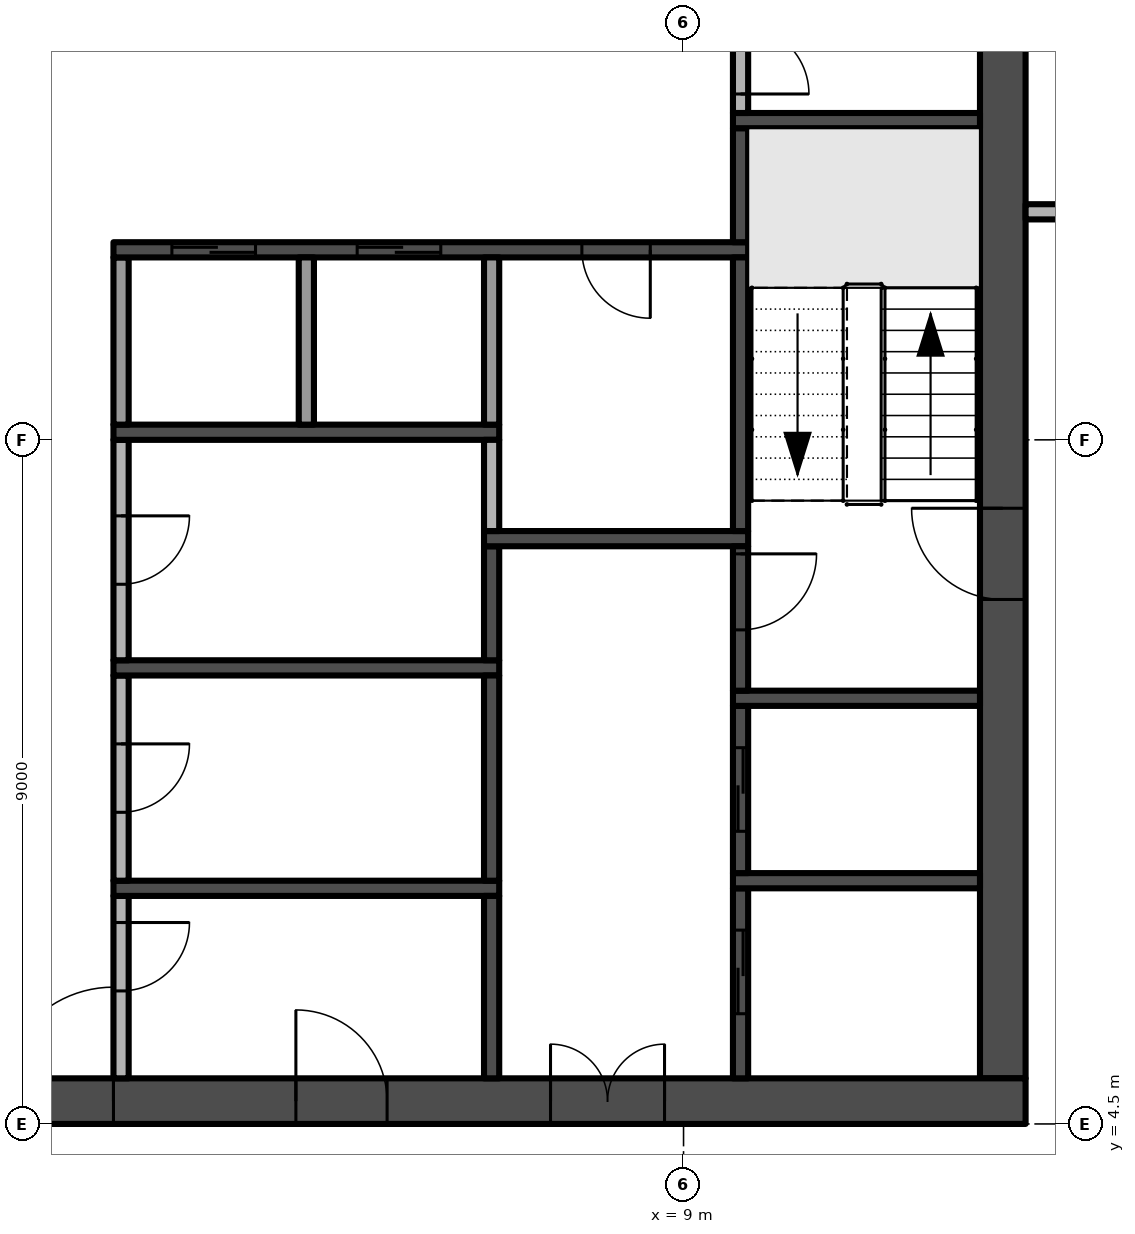
"""IFC4 building model, lengths in metres.
Left out: names, types, materials, properties, quantities, classifications, styles, units other than length and angle.
Written with IfcOpenShell. Run it as: python <this file> out.ifc"""

import sys

from ifc_helpers import new_model, si_unit, direction, frame, frame_2d, origin, place, context, subcontext, project, spatial, rectangle, extrude, element, fill, save


model = new_model("IFC4")
c1 = context("Model", 3, precision=1e-05, world=origin(), true_north=direction((0.0, 1.0)))
c2 = subcontext(c1, "Body", "Model", "MODEL_VIEW")
j1 = project(units=[si_unit("LENGTHUNIT", "METRE"), si_unit("PLANEANGLEUNIT", "RADIAN")], contexts=[c1])
p1 = place(None, origin())
s1 = spatial("IfcSite", under=j1, at=p1, CompositionType="ELEMENT")
p2 = place(p1, origin())
s2 = spatial("IfcBuilding", under=s1, at=p2, CompositionType="ELEMENT")
p3 = place(p2, frame((0.0, 0.0, 211.0)))
s3 = spatial("IfcBuildingStorey", under=s2, at=p3, CompositionType="ELEMENT", Elevation=211.0)
p4 = place(p3, frame((-13.5, 4.8, -0.3), z_axis=(0.0, 0.0, 1.0), x_axis=(1.0, 0.0, 0.0)))
e1 = element("IfcWall", 1, at=p4, inside=s3, PredefinedType="SHEAR", context=c2, shape_type="SweptSolid", body=[
    extrude(rectangle(XDim=27.0, YDim=0.6, at=frame_2d((13.5, 0.0))), origin(), (0.0, 0.0, 1.0), 3.8),
])
p5 = place(p4, frame((12.0, 0.0, 0.3)))
e2 = element("IfcOpeningElement", 2, at=p5, cuts=e1, PredefinedType="OPENING", context=c2, shape_type="SweptSolid", body=[
    extrude(rectangle(XDim=3.0, YDim=2.4, at=frame_2d((1.5, 1.2))), frame((0.0, 0.31, 0.0), z_axis=(0.0, -1.0, 0.0), x_axis=(1.0, 0.0, 0.0)), (0.0, 0.0, 1.0), 0.62),
])
p6 = place(p4, frame((4.9, 0.0, 0.3)))
e3 = element("IfcOpeningElement", 3, at=p6, cuts=e1, PredefinedType="OPENING", context=c2, shape_type="SweptSolid", body=[
    extrude(rectangle(XDim=1.2, YDim=2.2, at=frame_2d((0.6, 1.1))), frame((0.0, 0.31, 0.0), z_axis=(0.0, -1.0, 0.0), x_axis=(1.0, 0.0, 0.0)), (0.0, 0.0, 1.0), 0.62),
])
p7 = place(p4, frame((20.75, 0.0, 0.3)))
e4 = element("IfcOpeningElement", 4, at=p7, cuts=e1, PredefinedType="OPENING", context=c2, shape_type="SweptSolid", body=[
    extrude(rectangle(XDim=1.5, YDim=2.2, at=frame_2d((0.75, 1.1))), frame((0.0, 0.31, 0.0), z_axis=(0.0, -1.0, 0.0), x_axis=(1.0, 0.0, 0.0)), (0.0, 0.0, 1.0), 0.62),
])
p8 = place(p4, frame((17.4, 0.0, 0.3)))
e5 = element("IfcOpeningElement", 5, at=p8, cuts=e1, PredefinedType="OPENING", context=c2, shape_type="SweptSolid", body=[
    extrude(rectangle(XDim=1.2, YDim=2.2, at=frame_2d((0.6, 1.1))), frame((0.0, 0.31, 0.0), z_axis=(0.0, -1.0, 0.0), x_axis=(1.0, 0.0, 0.0)), (0.0, 0.0, 1.0), 0.62),
])
p9 = place(p3, frame((13.2, 5.1, -0.3), z_axis=(0.0, 0.0, 1.0), x_axis=(0.0, 1.0, 0.0)))
e6 = element("IfcWall", 6, at=p9, inside=s3, PredefinedType="SHEAR", context=c2, shape_type="SweptSolid", body=[
    extrude(rectangle(XDim=16.8, YDim=0.6, at=frame_2d((8.4, 0.0))), origin(), (0.0, 0.0, 1.0), 3.8),
])
p10 = place(p9, frame((6.3, 0.0, 0.3)))
e7 = element("IfcOpeningElement", 7, at=p10, cuts=e6, PredefinedType="OPENING", context=c2, shape_type="SweptSolid", body=[
    extrude(rectangle(XDim=1.2, YDim=2.2, at=frame_2d((0.6, 1.1))), frame((0.0, 0.31, 0.0), z_axis=(0.0, -1.0, 0.0), x_axis=(1.0, 0.0, 0.0)), (0.0, 0.0, 1.0), 0.62),
])
p11 = place(p3, frame((1.6, 7.5, 0.0), z_axis=(0.0, 0.0, 1.0), x_axis=(0.0, -1.0, 0.0)))
e8 = element("IfcWall", 8, at=p11, inside=s3, PredefinedType="PARTITIONING", context=c2, shape_type="SweptSolid", body=[
    extrude(rectangle(XDim=2.4, YDim=0.2, at=frame_2d((1.2, 0.0))), origin(), (0.0, 0.0, 1.0), 3.5),
])
p12 = place(p11, frame((0.35, 0.0, 0.0)))
e9 = element("IfcOpeningElement", 9, at=p12, cuts=e8, PredefinedType="OPENING", context=c2, shape_type="SweptSolid", body=[
    extrude(rectangle(XDim=0.9, YDim=2.1, at=frame_2d((0.45, 1.05))), frame((0.0, 0.11, 0.0), z_axis=(0.0, -1.0, 0.0), x_axis=(1.0, 0.0, 0.0)), (0.0, 0.0, 1.0), 0.22),
])
p13 = place(p3, frame((1.5, 7.6, 0.0), z_axis=(0.0, 0.0, 1.0), x_axis=(1.0, 0.0, 0.0)))
e10 = element("IfcWall", 10, at=p13, inside=s3, PredefinedType="SHEAR", context=c2, shape_type="SweptSolid", body=[
    extrude(rectangle(XDim=5.075, YDim=0.2, at=frame_2d((2.538, 0.0))), origin(), (0.0, 0.0, 1.0), 3.5),
])
p14 = place(p3, frame((1.6, 10.4, 0.0), z_axis=(0.0, 0.0, 1.0), x_axis=(0.0, -1.0, 0.0)))
e11 = element("IfcWall", 11, at=p14, inside=s3, PredefinedType="PARTITIONING", context=c2, shape_type="SweptSolid", body=[
    extrude(rectangle(XDim=2.7, YDim=0.2, at=frame_2d((1.35, 0.0))), origin(), (0.0, 0.0, 1.0), 3.5),
])
p15 = place(p14, frame((0.9, 0.0, 0.0)))
e12 = element("IfcOpeningElement", 12, at=p15, cuts=e11, PredefinedType="OPENING", context=c2, shape_type="SweptSolid", body=[
    extrude(rectangle(XDim=0.9, YDim=2.1, at=frame_2d((0.45, 1.05))), frame((0.0, 0.11, 0.0), z_axis=(0.0, -1.0, 0.0), x_axis=(1.0, 0.0, 0.0)), (0.0, 0.0, 1.0), 0.22),
])
p16 = place(p3, frame((1.5, 10.5, 0.0), z_axis=(0.0, 0.0, 1.0), x_axis=(1.0, 0.0, 0.0)))
e13 = element("IfcWall", 13, at=p16, inside=s3, PredefinedType="SHEAR", context=c2, shape_type="SweptSolid", body=[
    extrude(rectangle(XDim=5.075, YDim=0.2, at=frame_2d((2.538, 0.0))), origin(), (0.0, 0.0, 1.0), 3.5),
])
p17 = place(p3, frame((1.6, 13.5, 0.0), z_axis=(0.0, 0.0, 1.0), x_axis=(0.0, -1.0, 0.0)))
e14 = element("IfcWall", 14, at=p17, inside=s3, PredefinedType="PARTITIONING", context=c2, shape_type="SweptSolid", body=[
    extrude(rectangle(XDim=2.9, YDim=0.2, at=frame_2d((1.45, 0.0))), origin(), (0.0, 0.0, 1.0), 3.5),
])
p18 = place(p17, frame((1.0, 0.0, 0.0)))
e15 = element("IfcOpeningElement", 15, at=p18, cuts=e14, PredefinedType="OPENING", context=c2, shape_type="SweptSolid", body=[
    extrude(rectangle(XDim=0.9, YDim=2.1, at=frame_2d((0.45, 1.05))), frame((0.0, 0.11, 0.0), z_axis=(0.0, -1.0, 0.0), x_axis=(1.0, 0.0, 0.0)), (0.0, 0.0, 1.0), 0.22),
])
p19 = place(p3, frame((1.5, 13.6, 0.0), z_axis=(0.0, 0.0, 1.0), x_axis=(1.0, 0.0, 0.0)))
e16 = element("IfcWall", 16, at=p19, inside=s3, PredefinedType="SHEAR", context=c2, shape_type="SweptSolid", body=[
    extrude(rectangle(XDim=5.075, YDim=0.2, at=frame_2d((2.538, 0.0))), origin(), (0.0, 0.0, 1.0), 3.5),
])
p20 = place(p3, frame((1.6, 13.7, 0.0), z_axis=(0.0, 0.0, 1.0), x_axis=(0.0, 1.0, 0.0)))
e17 = element("IfcWall", 17, at=p20, inside=s3, PredefinedType="PARTITIONING", context=c2, shape_type="SweptSolid", body=[
    extrude(rectangle(XDim=2.2, YDim=0.2, at=frame_2d((1.1, 0.0))), origin(), (0.0, 0.0, 1.0), 3.5),
])
p21 = place(p3, frame((9.85, 16.0, 0.0), z_axis=(0.0, 0.0, 1.0), x_axis=(-1.0, 0.0, 0.0)))
e18 = element("IfcWall", 18, at=p21, inside=s3, PredefinedType="SHEAR", context=c2, shape_type="SweptSolid", body=[
    extrude(rectangle(XDim=8.35, YDim=0.2, at=frame_2d((4.175, 0.0))), origin(), (0.0, 0.0, 1.0), 3.5),
])
p22 = place(p21, frame((6.481, 0.0, 0.0)))
e19 = element("IfcOpeningElement", 19, at=p22, cuts=e18, PredefinedType="OPENING", context=c2, shape_type="SweptSolid", body=[
    extrude(rectangle(XDim=1.1, YDim=2.1, at=frame_2d((0.55, 1.05))), frame((0.0, 0.11, 0.0), z_axis=(0.0, -1.0, 0.0), x_axis=(1.0, 0.0, 0.0)), (0.0, 0.0, 1.0), 0.22),
])
p23 = place(p21, frame((4.044, 0.0, 0.0)))
e20 = element("IfcOpeningElement", 20, at=p23, cuts=e18, PredefinedType="OPENING", context=c2, shape_type="SweptSolid", body=[
    extrude(rectangle(XDim=1.1, YDim=2.1, at=frame_2d((0.55, 1.05))), frame((0.0, 0.11, 0.0), z_axis=(0.0, -1.0, 0.0), x_axis=(1.0, 0.0, 0.0)), (0.0, 0.0, 1.0), 0.22),
])
p24 = place(p21, frame((1.288, 0.0, 0.0)))
e21 = element("IfcOpeningElement", 21, at=p24, cuts=e18, PredefinedType="OPENING", context=c2, shape_type="SweptSolid", body=[
    extrude(rectangle(XDim=0.9, YDim=2.1, at=frame_2d((0.45, 1.05))), frame((0.0, 0.11, 0.0), z_axis=(0.0, -1.0, 0.0), x_axis=(1.0, 0.0, 0.0)), (0.0, 0.0, 1.0), 0.22),
])
p25 = place(p3, frame((4.037, 13.7, 0.0), z_axis=(0.0, 0.0, 1.0), x_axis=(0.0, 1.0, 0.0)))
e22 = element("IfcWall", 22, at=p25, inside=s3, PredefinedType="PARTITIONING", context=c2, shape_type="SweptSolid", body=[
    extrude(rectangle(XDim=2.2, YDim=0.2, at=frame_2d((1.1, 0.0))), origin(), (0.0, 0.0, 1.0), 3.5),
])
p26 = place(p3, frame((6.475, 5.1, 0.0), z_axis=(0.0, 0.0, 1.0), x_axis=(0.0, 1.0, 0.0)))
e23 = element("IfcWall", 23, at=p26, inside=s3, PredefinedType="SHEAR", context=c2, shape_type="SweptSolid", body=[
    extrude(rectangle(XDim=2.4, YDim=0.2, at=frame_2d((1.2, 0.0))), origin(), (0.0, 0.0, 1.0), 3.5),
])
p27 = place(p3, frame((6.475, 7.7, 0.0), z_axis=(0.0, 0.0, 1.0), x_axis=(0.0, 1.0, 0.0)))
e24 = element("IfcWall", 24, at=p27, inside=s3, PredefinedType="SHEAR", context=c2, shape_type="SweptSolid", body=[
    extrude(rectangle(XDim=2.7, YDim=0.2, at=frame_2d((1.35, 0.0))), origin(), (0.0, 0.0, 1.0), 3.5),
])
p28 = place(p3, frame((6.475, 10.6, 0.0), z_axis=(0.0, 0.0, 1.0), x_axis=(0.0, 1.0, 0.0)))
e25 = element("IfcWall", 25, at=p28, inside=s3, PredefinedType="SHEAR", context=c2, shape_type="SweptSolid", body=[
    extrude(rectangle(XDim=1.5, YDim=0.2, at=frame_2d((0.75, 0.0))), origin(), (0.0, 0.0, 1.0), 3.5),
])
p29 = place(p3, frame((6.375, 12.2, 0.0), z_axis=(0.0, 0.0, 1.0), x_axis=(1.0, 0.0, 0.0)))
e26 = element("IfcWall", 26, at=p29, inside=s3, PredefinedType="SHEAR", context=c2, shape_type="SweptSolid", body=[
    extrude(rectangle(XDim=3.475, YDim=0.2, at=frame_2d((1.738, 0.0))), origin(), (0.0, 0.0, 1.0), 3.5),
])
p30 = place(p3, frame((6.475, 12.3, 0.0), z_axis=(0.0, 0.0, 1.0), x_axis=(0.0, 1.0, 0.0)))
e27 = element("IfcWall", 27, at=p30, inside=s3, PredefinedType="PARTITIONING", context=c2, shape_type="SweptSolid", body=[
    extrude(rectangle(XDim=1.2, YDim=0.2, at=frame_2d((0.6, 0.0))), origin(), (0.0, 0.0, 1.0), 3.5),
])
p31 = place(p3, frame((6.475, 13.7, 0.0), z_axis=(0.0, 0.0, 1.0), x_axis=(0.0, 1.0, 0.0)))
e28 = element("IfcWall", 28, at=p31, inside=s3, PredefinedType="PARTITIONING", context=c2, shape_type="SweptSolid", body=[
    extrude(rectangle(XDim=2.2, YDim=0.2, at=frame_2d((1.1, 0.0))), origin(), (0.0, 0.0, 1.0), 3.5),
])
p32 = place(p3, frame((9.75, 5.1, 0.0), z_axis=(0.0, 0.0, 1.0), x_axis=(0.0, 1.0, 0.0)))
e29 = element("IfcWall", 29, at=p32, inside=s3, PredefinedType="SHEAR", context=c2, shape_type="SweptSolid", body=[
    extrude(rectangle(XDim=2.5, YDim=0.2, at=frame_2d((1.25, 0.0))), origin(), (0.0, 0.0, 1.0), 3.5),
])
p33 = place(p32, frame((0.85, 0.0, 0.0)))
e30 = element("IfcOpeningElement", 30, at=p33, cuts=e29, PredefinedType="OPENING", context=c2, shape_type="SweptSolid", body=[
    extrude(rectangle(XDim=1.1, YDim=2.1, at=frame_2d((0.55, 1.05))), frame((0.0, 0.11, 0.0), z_axis=(0.0, -1.0, 0.0), x_axis=(1.0, 0.0, 0.0)), (0.0, 0.0, 1.0), 0.22),
])
p34 = place(p3, frame((9.65, 7.7, 0.0), z_axis=(0.0, 0.0, 1.0), x_axis=(1.0, 0.0, 0.0)))
e31 = element("IfcWall", 31, at=p34, inside=s3, PredefinedType="SHEAR", context=c2, shape_type="SweptSolid", body=[
    extrude(rectangle(XDim=3.25, YDim=0.2, at=frame_2d((1.625, 0.0))), origin(), (0.0, 0.0, 1.0), 3.5),
])
p35 = place(p3, frame((9.75, 7.8, 0.0), z_axis=(0.0, 0.0, 1.0), x_axis=(0.0, 1.0, 0.0)))
e32 = element("IfcWall", 32, at=p35, inside=s3, PredefinedType="SHEAR", context=c2, shape_type="SweptSolid", body=[
    extrude(rectangle(XDim=2.2, YDim=0.2, at=frame_2d((1.1, 0.0))), origin(), (0.0, 0.0, 1.0), 3.5),
])
p36 = place(p35, frame((0.55, 0.0, 0.0)))
e33 = element("IfcOpeningElement", 33, at=p36, cuts=e32, PredefinedType="OPENING", context=c2, shape_type="SweptSolid", body=[
    extrude(rectangle(XDim=1.1, YDim=2.1, at=frame_2d((0.55, 1.05))), frame((0.0, 0.11, 0.0), z_axis=(0.0, -1.0, 0.0), x_axis=(1.0, 0.0, 0.0)), (0.0, 0.0, 1.0), 0.22),
])
p37 = place(p3, frame((9.65, 10.1, 0.0), z_axis=(0.0, 0.0, 1.0), x_axis=(1.0, 0.0, 0.0)))
e34 = element("IfcWall", 34, at=p37, inside=s3, PredefinedType="SHEAR", context=c2, shape_type="SweptSolid", body=[
    extrude(rectangle(XDim=3.25, YDim=0.2, at=frame_2d((1.625, 0.0))), origin(), (0.0, 0.0, 1.0), 3.5),
])
p38 = place(p3, frame((9.75, 12.1, 0.0), z_axis=(0.0, 0.0, 1.0), x_axis=(0.0, -1.0, 0.0)))
e35 = element("IfcWall", 35, at=p38, inside=s3, PredefinedType="SHEAR", context=c2, shape_type="SweptSolid", body=[
    extrude(rectangle(XDim=1.9, YDim=0.2, at=frame_2d((0.95, 0.0))), origin(), (0.0, 0.0, 1.0), 3.5),
])
p39 = place(p38, frame((0.1, 0.0, 0.0)))
e36 = element("IfcOpeningElement", 36, at=p39, cuts=e35, PredefinedType="OPENING", context=c2, shape_type="SweptSolid", body=[
    extrude(rectangle(XDim=1.0, YDim=2.2, at=frame_2d((0.5, 1.1))), frame((0.0, 0.11, 0.0), z_axis=(0.0, -1.0, 0.0), x_axis=(1.0, 0.0, 0.0)), (0.0, 0.0, 1.0), 0.22),
])
p40 = place(p3, frame((9.75, 12.3, 0.0), z_axis=(0.0, 0.0, 1.0), x_axis=(0.0, 1.0, 0.0)))
e37 = element("IfcWall", 37, at=p40, inside=s3, PredefinedType="SHEAR", context=c2, shape_type="SweptSolid", body=[
    extrude(rectangle(XDim=3.6, YDim=0.2, at=frame_2d((1.8, 0.0))), origin(), (0.0, 0.0, 1.0), 3.5),
])
p41 = place(p3, frame((9.75, 16.1, 0.0), z_axis=(0.0, 0.0, 1.0), x_axis=(0.0, 1.0, 0.0)))
e38 = element("IfcWall", 38, at=p41, inside=s3, PredefinedType="SHEAR", context=c2, shape_type="SweptSolid", body=[
    extrude(rectangle(XDim=1.5, YDim=0.2, at=frame_2d((0.75, 0.0))), origin(), (0.0, 0.0, 1.0), 3.5),
])
p42 = place(p3, frame((9.65, 17.7, 0.0), z_axis=(0.0, 0.0, 1.0), x_axis=(1.0, 0.0, 0.0)))
e39 = element("IfcWall", 39, at=p42, inside=s3, PredefinedType="SHEAR", context=c2, shape_type="SweptSolid", body=[
    extrude(rectangle(XDim=3.25, YDim=0.2, at=frame_2d((1.625, 0.0))), origin(), (0.0, 0.0, 1.0), 3.5),
])
p43 = place(p3, frame((9.75, 19.2, 0.0), z_axis=(0.0, 0.0, 1.0), x_axis=(0.0, -1.0, 0.0)))
e40 = element("IfcWall", 40, at=p43, inside=s3, PredefinedType="PARTITIONING", context=c2, shape_type="SweptSolid", body=[
    extrude(rectangle(XDim=1.4, YDim=0.2, at=frame_2d((0.7, 0.0))), origin(), (0.0, 0.0, 1.0), 3.5),
])
p44 = place(p43, frame((0.25, 0.0, 0.0)))
e41 = element("IfcOpeningElement", 41, at=p44, cuts=e40, PredefinedType="OPENING", context=c2, shape_type="SweptSolid", body=[
    extrude(rectangle(XDim=0.9, YDim=2.1, at=frame_2d((0.45, 1.05))), frame((0.0, 0.11, 0.0), z_axis=(0.0, -1.0, 0.0), x_axis=(1.0, 0.0, 0.0)), (0.0, 0.0, 1.0), 0.22),
])
p45 = place(p3, frame((13.5, 16.5, 0.0), z_axis=(0.0, 0.0, 1.0), x_axis=(1.0, 0.0, 0.0)))
e42 = element("IfcWall", 42, at=p45, inside=s3, PredefinedType="PARTITIONING", context=c2, shape_type="SweptSolid", body=[
    extrude(rectangle(XDim=3.825, YDim=0.2, at=frame_2d((1.913, 0.0))), origin(), (0.0, 0.0, 1.0), 3.5),
])
p46 = place(p45, frame((1.55, 0.0, 0.0)))
e43 = element("IfcOpeningElement", 43, at=p46, cuts=e42, PredefinedType="OPENING", context=c2, shape_type="SweptSolid", body=[
    extrude(rectangle(XDim=0.9, YDim=2.1, at=frame_2d((0.45, 1.05))), frame((0.0, 0.11, 0.0), z_axis=(0.0, -1.0, 0.0), x_axis=(1.0, 0.0, 0.0)), (0.0, 0.0, 1.0), 0.22),
])
p47 = place(p5, frame((3.0, 0.0, 0.0), z_axis=(0.0, 0.0, 1.0), x_axis=(-1.0, 0.0, 0.0)))
e44 = element("IfcDoor", 44, at=p47, inside=s3, OperationType="DOUBLE_DOOR_SINGLE_SWING", PredefinedType="DOOR", context=c2, shape_type="SweptSolid", body=[
    extrude(rectangle(XDim=3.0, YDim=2.4, at=frame_2d((1.5, 1.2))), frame((0.0, 0.025, 0.0), z_axis=(0.0, -1.0, 0.0), x_axis=(1.0, 0.0, 0.0)), (0.0, 0.0, 1.0), 0.05),
])
fill(e2, e44)
p48 = place(p10, frame((1.2, 0.0, 0.0), z_axis=(0.0, 0.0, 1.0), x_axis=(-1.0, 0.0, 0.0)))
e45 = element("IfcDoor", 45, at=p48, inside=s3, OperationType="SINGLE_SWING_LEFT", PredefinedType="DOOR", context=c2, shape_type="SweptSolid", body=[
    extrude(rectangle(XDim=1.2, YDim=2.2, at=frame_2d((0.6, 1.1))), frame((0.0, 0.025, 0.0), z_axis=(0.0, -1.0, 0.0), x_axis=(1.0, 0.0, 0.0)), (0.0, 0.0, 1.0), 0.05),
])
fill(e7, e45)
p49 = place(p7, frame((1.5, 0.0, 0.0), z_axis=(0.0, 0.0, 1.0), x_axis=(-1.0, 0.0, 0.0)))
e46 = element("IfcDoor", 46, at=p49, inside=s3, OperationType="DOUBLE_DOOR_SINGLE_SWING", PredefinedType="DOOR", context=c2, shape_type="SweptSolid", body=[
    extrude(rectangle(XDim=1.5, YDim=2.2, at=frame_2d((0.75, 1.1))), frame((0.0, 0.025, 0.0), z_axis=(0.0, -1.0, 0.0), x_axis=(1.0, 0.0, 0.0)), (0.0, 0.0, 1.0), 0.05),
])
fill(e4, e46)
p50 = place(p8, frame((1.2, 0.0, 0.0), z_axis=(0.0, 0.0, 1.0), x_axis=(-1.0, 0.0, 0.0)))
e47 = element("IfcDoor", 47, at=p50, inside=s3, OperationType="SINGLE_SWING_RIGHT", PredefinedType="DOOR", context=c2, shape_type="SweptSolid", body=[
    extrude(rectangle(XDim=1.2, YDim=2.2, at=frame_2d((0.6, 1.1))), frame((0.0, 0.025, 0.0), z_axis=(0.0, -1.0, 0.0), x_axis=(1.0, 0.0, 0.0)), (0.0, 0.0, 1.0), 0.05),
])
fill(e5, e47)
p51 = place(p39, origin())
e48 = element("IfcDoor", 48, at=p51, inside=s3, OperationType="SINGLE_SWING_LEFT", PredefinedType="DOOR", context=c2, shape_type="SweptSolid", body=[
    extrude(rectangle(XDim=1.0, YDim=2.2, at=frame_2d((0.5, 1.1))), frame((0.0, 0.025, 0.0), z_axis=(0.0, -1.0, 0.0), x_axis=(1.0, 0.0, 0.0)), (0.0, 0.0, 1.0), 0.05),
])
fill(e36, e48)
p52 = place(p22, origin())
e49 = element("IfcDoor", 49, at=p52, inside=s3, OperationType="SLIDING_TO_RIGHT", PredefinedType="DOOR", context=c2, shape_type="SweptSolid", body=[
    extrude(rectangle(XDim=1.1, YDim=2.1, at=frame_2d((0.55, 1.05))), frame((0.0, 0.025, 0.0), z_axis=(0.0, -1.0, 0.0), x_axis=(1.0, 0.0, 0.0)), (0.0, 0.0, 1.0), 0.05),
])
fill(e19, e49)
p53 = place(p23, origin())
e50 = element("IfcDoor", 50, at=p53, inside=s3, OperationType="SLIDING_TO_RIGHT", PredefinedType="DOOR", context=c2, shape_type="SweptSolid", body=[
    extrude(rectangle(XDim=1.1, YDim=2.1, at=frame_2d((0.55, 1.05))), frame((0.0, 0.025, 0.0), z_axis=(0.0, -1.0, 0.0), x_axis=(1.0, 0.0, 0.0)), (0.0, 0.0, 1.0), 0.05),
])
fill(e20, e50)
p54 = place(p33, origin())
e51 = element("IfcDoor", 51, at=p54, inside=s3, OperationType="SLIDING_TO_RIGHT", PredefinedType="DOOR", context=c2, shape_type="SweptSolid", body=[
    extrude(rectangle(XDim=1.1, YDim=2.1, at=frame_2d((0.55, 1.05))), frame((0.0, 0.025, 0.0), z_axis=(0.0, -1.0, 0.0), x_axis=(1.0, 0.0, 0.0)), (0.0, 0.0, 1.0), 0.05),
])
fill(e30, e51)
p55 = place(p36, origin())
e52 = element("IfcDoor", 52, at=p55, inside=s3, OperationType="SLIDING_TO_RIGHT", PredefinedType="DOOR", context=c2, shape_type="SweptSolid", body=[
    extrude(rectangle(XDim=1.1, YDim=2.1, at=frame_2d((0.55, 1.05))), frame((0.0, 0.025, 0.0), z_axis=(0.0, -1.0, 0.0), x_axis=(1.0, 0.0, 0.0)), (0.0, 0.0, 1.0), 0.05),
])
fill(e33, e52)
p56 = place(p12, origin())
e53 = element("IfcDoor", 53, at=p56, inside=s3, OperationType="SINGLE_SWING_LEFT", PredefinedType="DOOR", context=c2, shape_type="SweptSolid", body=[
    extrude(rectangle(XDim=0.9, YDim=2.1, at=frame_2d((0.45, 1.05))), frame((0.0, 0.025, 0.0), z_axis=(0.0, -1.0, 0.0), x_axis=(1.0, 0.0, 0.0)), (0.0, 0.0, 1.0), 0.05),
])
fill(e9, e53)
p57 = place(p15, origin())
e54 = element("IfcDoor", 54, at=p57, inside=s3, OperationType="SINGLE_SWING_LEFT", PredefinedType="DOOR", context=c2, shape_type="SweptSolid", body=[
    extrude(rectangle(XDim=0.9, YDim=2.1, at=frame_2d((0.45, 1.05))), frame((0.0, 0.025, 0.0), z_axis=(0.0, -1.0, 0.0), x_axis=(1.0, 0.0, 0.0)), (0.0, 0.0, 1.0), 0.05),
])
fill(e12, e54)
p58 = place(p18, origin())
e55 = element("IfcDoor", 55, at=p58, inside=s3, OperationType="SINGLE_SWING_LEFT", PredefinedType="DOOR", context=c2, shape_type="SweptSolid", body=[
    extrude(rectangle(XDim=0.9, YDim=2.1, at=frame_2d((0.45, 1.05))), frame((0.0, 0.025, 0.0), z_axis=(0.0, -1.0, 0.0), x_axis=(1.0, 0.0, 0.0)), (0.0, 0.0, 1.0), 0.05),
])
fill(e15, e55)
p59 = place(p24, origin())
e56 = element("IfcDoor", 56, at=p59, inside=s3, OperationType="SINGLE_SWING_LEFT", PredefinedType="DOOR", context=c2, shape_type="SweptSolid", body=[
    extrude(rectangle(XDim=0.9, YDim=2.1, at=frame_2d((0.45, 1.05))), frame((0.0, 0.025, 0.0), z_axis=(0.0, -1.0, 0.0), x_axis=(1.0, 0.0, 0.0)), (0.0, 0.0, 1.0), 0.05),
])
fill(e21, e56)
p60 = place(p44, origin())
e57 = element("IfcDoor", 57, at=p60, inside=s3, OperationType="SINGLE_SWING_RIGHT", PredefinedType="DOOR", context=c2, shape_type="SweptSolid", body=[
    extrude(rectangle(XDim=0.9, YDim=2.1, at=frame_2d((0.45, 1.05))), frame((0.0, 0.025, 0.0), z_axis=(0.0, -1.0, 0.0), x_axis=(1.0, 0.0, 0.0)), (0.0, 0.0, 1.0), 0.05),
])
fill(e41, e57)
save(model, sys.argv[1])
